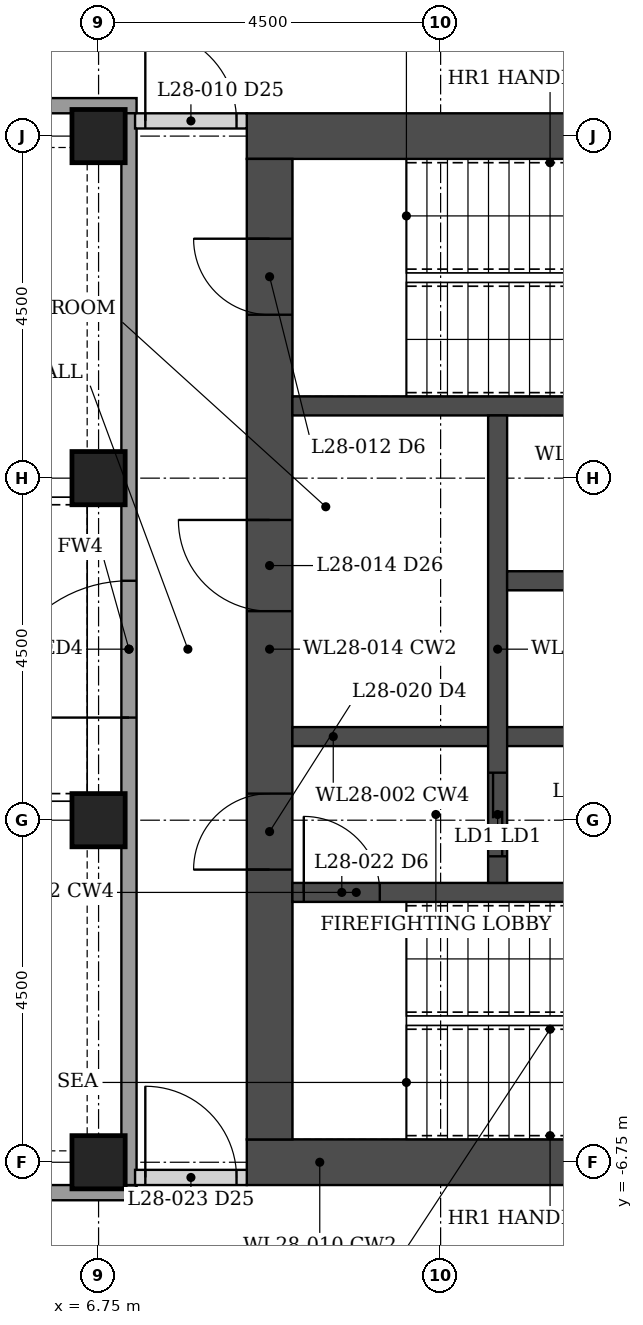
"""IFC4 building model, lengths in metres.
Left out: names, types, materials, properties, quantities, classifications, styles, units other than length and angle.
Written with IfcOpenShell. Run it as: python <this file> out.ifc"""

import sys

from ifc_helpers import new_model, si_unit, direction, frame, frame_2d, origin, origin_2d, place, context, subcontext, project, spatial, rectangle, hollow_rectangle, extrude, element, fill, save


model = new_model("IFC4")
c1 = context("Model", 3, precision=1e-05, world=origin(), true_north=direction((0.0, 1.0)))
c2 = subcontext(c1, "Body", "Model", "MODEL_VIEW")
j1 = project(units=[si_unit("LENGTHUNIT", "METRE"), si_unit("PLANEANGLEUNIT", "RADIAN")], contexts=[c1])
p1 = place(None, origin())
s1 = spatial("IfcSite", under=j1, at=p1, CompositionType="ELEMENT")
p2 = place(p1, origin())
s2 = spatial("IfcBuilding", under=s1, at=p2, CompositionType="ELEMENT")
p3 = place(p2, frame((0.0, 0.0, 107.0)))
s3 = spatial("IfcBuildingStorey", under=s2, at=p3, CompositionType="ELEMENT", Elevation=107.0)
for number, where, z_axis, x_axis in (
    (1, (6.75, -6.75, 0.0), (0.0, 0.0, 1.0), (1.0, 0.0, 0.0)),
    (2, (6.75, -2.25, 0.0), (0.0, 0.0, 1.0), (1.0, 0.0, 0.0)),
    (3, (6.75, 2.25, 0.0), (0.0, 0.0, 1.0), (1.0, 0.0, 0.0)),
    (4, (6.75, 6.75, 0.0), (0.0, 0.0, 1.0), (1.0, 0.0, 0.0)),
):
    element("IfcColumn", number, at=place(p3, frame(where, z_axis=z_axis, x_axis=x_axis)), inside=s3, PredefinedType="COLUMN", context=c2, shape_type="SweptSolid", body=[
        extrude(hollow_rectangle(XDim=0.7, YDim=0.7, WallThickness=0.05, at=origin_2d()), origin(), (0.0, 0.0, 1.0), 5.4),
    ])
for number, where, z_axis, x_axis in (
    (5, (8.7, -6.75, 0.0), (0.0, 0.0, 1.0), (1.0, 0.0, 0.0)),
    (6, (8.7, 6.75, 0.0), (0.0, 0.0, 1.0), (1.0, 0.0, 0.0)),
):
    element("IfcWall", number, at=place(p3, frame(where, z_axis=z_axis, x_axis=x_axis)), inside=s3, PredefinedType="SHEAR", context=c2, shape_type="SweptSolid", body=[
        extrude(rectangle(XDim=9.6, YDim=0.6, at=frame_2d((4.8, 0.0))), origin(), (0.0, 0.0, 1.0), 5.4),
    ])
p4 = place(p3, frame((9.0, -6.45, 0.0), z_axis=(0.0, 0.0, 1.0), x_axis=(0.0, 1.0, 0.0)))
e7 = element("IfcWall", 7, at=p4, inside=s3, PredefinedType="SHEAR", context=c2, shape_type="SweptSolid", body=[
    extrude(rectangle(XDim=12.9, YDim=0.6, at=frame_2d((6.45, 0.0))), origin(), (0.0, 0.0, 1.0), 5.4),
])
p5 = place(p4, frame((3.55, 0.0, 0.0)))
e8 = element("IfcOpeningElement", 8, at=p5, cuts=e7, PredefinedType="OPENING", context=c2, shape_type="SweptSolid", body=[
    extrude(rectangle(XDim=1.0, YDim=2.1, at=frame_2d((0.5, 1.05))), frame((0.0, 0.31, 0.0), z_axis=(0.0, -1.0, 0.0), x_axis=(1.0, 0.0, 0.0)), (0.0, 0.0, 1.0), 0.62),
])
p6 = place(p4, frame((6.95, 0.0, 0.0)))
e9 = element("IfcOpeningElement", 9, at=p6, cuts=e7, PredefinedType="OPENING", context=c2, shape_type="SweptSolid", body=[
    extrude(rectangle(XDim=1.2, YDim=2.1, at=frame_2d((0.6, 1.05))), frame((0.0, 0.31, 0.0), z_axis=(0.0, -1.0, 0.0), x_axis=(1.0, 0.0, 0.0)), (0.0, 0.0, 1.0), 0.62),
])
p7 = place(p4, frame((10.85, 0.0, 0.0)))
e10 = element("IfcOpeningElement", 10, at=p7, cuts=e7, PredefinedType="OPENING", context=c2, shape_type="SweptSolid", body=[
    extrude(rectangle(XDim=1.0, YDim=2.1, at=frame_2d((0.5, 1.05))), frame((0.0, 0.31, 0.0), z_axis=(0.0, -1.0, 0.0), x_axis=(1.0, 0.0, 0.0)), (0.0, 0.0, 1.0), 0.62),
])
p8 = place(p3, frame((9.3, -3.2, 0.0), z_axis=(0.0, 0.0, 1.0), x_axis=(1.0, 0.0, 0.0)))
e11 = element("IfcWall", 11, at=p8, inside=s3, PredefinedType="SHEAR", context=c2, shape_type="SweptSolid", body=[
    extrude(rectangle(XDim=8.4, YDim=0.25, at=frame_2d((4.2, 0.0))), origin(), (0.0, 0.0, 1.0), 5.4),
])
p9 = place(p8, frame((0.15, 0.0, 0.0)))
e12 = element("IfcOpeningElement", 12, at=p9, cuts=e11, PredefinedType="OPENING", context=c2, shape_type="SweptSolid", body=[
    extrude(rectangle(XDim=1.0, YDim=2.1, at=frame_2d((0.5, 1.05))), frame((0.0, 0.135, 0.0), z_axis=(0.0, -1.0, 0.0), x_axis=(1.0, 0.0, 0.0)), (0.0, 0.0, 1.0), 0.27),
])
p10 = place(p3, frame((9.3, 3.2, 0.0), z_axis=(0.0, 0.0, 1.0), x_axis=(1.0, 0.0, 0.0)))
e13 = element("IfcWall", 13, at=p10, inside=s3, PredefinedType="SHEAR", context=c2, shape_type="SweptSolid", body=[
    extrude(rectangle(XDim=8.4, YDim=0.25, at=frame_2d((4.2, 0.0))), origin(), (0.0, 0.0, 1.0), 5.4),
])
p11 = place(p3, frame((9.3, -1.15, 0.0), z_axis=(0.0, 0.0, 1.0), x_axis=(1.0, 0.0, 0.0)))
e14 = element("IfcWall", 14, at=p11, inside=s3, PredefinedType="SHEAR", context=c2, shape_type="SweptSolid", body=[
    extrude(rectangle(XDim=5.375, YDim=0.25, at=frame_2d((2.688, 0.0))), origin(), (0.0, 0.0, 1.0), 5.4),
])
p12 = place(p3, frame((12.0, -3.075, 0.0), z_axis=(0.0, 0.0, 1.0), x_axis=(0.0, 1.0, 0.0)))
e15 = element("IfcWall", 15, at=p12, inside=s3, PredefinedType="SHEAR", context=c2, shape_type="SweptSolid", body=[
    extrude(rectangle(XDim=6.15, YDim=0.25, at=frame_2d((3.075, 0.0))), origin(), (0.0, 0.0, 1.0), 5.4),
])
p13 = place(p12, frame((0.35, 0.0, 0.0)))
e16 = element("IfcOpeningElement", 16, at=p13, cuts=e15, PredefinedType="OPENING", context=c2, shape_type="SweptSolid", body=[
    extrude(rectangle(XDim=1.1, YDim=2.1, at=frame_2d((0.55, 1.05))), frame((0.0, 0.135, 0.0), z_axis=(0.0, -1.0, 0.0), x_axis=(1.0, 0.0, 0.0)), (0.0, 0.0, 1.0), 0.27),
])
p14 = place(p3, frame((12.125, 0.9, 0.0), z_axis=(0.0, 0.0, 1.0), x_axis=(1.0, 0.0, 0.0)))
e17 = element("IfcWall", 17, at=p14, inside=s3, PredefinedType="SHEAR", context=c2, shape_type="SweptSolid", body=[
    extrude(rectangle(XDim=2.55, YDim=0.25, at=frame_2d((1.275, 0.0))), origin(), (0.0, 0.0, 1.0), 5.4),
])
for number, where, z_axis, x_axis in (
    (18, (-7.25, 7.15, 0.0), (0.0, 0.0, 1.0), (1.0, 0.0, 0.0)),
    (19, (-7.25, -7.15, 0.0), (0.0, 0.0, 1.0), (1.0, 0.0, 0.0)),
):
    element("IfcWall", number, at=place(p3, frame(where, z_axis=z_axis, x_axis=x_axis)), inside=s3, PredefinedType="SOLIDWALL", context=c2, shape_type="SweptSolid", body=[
        extrude(rectangle(XDim=14.5, YDim=0.2, at=frame_2d((7.25, 0.0))), origin(), (0.0, 0.0, 1.0), 4.229),
    ])
p15 = place(p3, frame((7.15, -7.05, 0.0), z_axis=(0.0, 0.0, 1.0), x_axis=(0.0, 1.0, 0.0)))
e20 = element("IfcWall", 20, at=p15, inside=s3, PredefinedType="SOLIDWALL", context=c2, shape_type="SweptSolid", body=[
    extrude(rectangle(XDim=14.1, YDim=0.2, at=frame_2d((7.05, 0.0))), origin(), (0.0, 0.0, 1.0), 4.229),
])
p16 = place(p15, frame((6.15, 0.0, 0.0)))
e21 = element("IfcOpeningElement", 21, at=p16, cuts=e20, PredefinedType="OPENING", context=c2, shape_type="SweptSolid", body=[
    extrude(rectangle(XDim=1.8, YDim=2.2, at=frame_2d((0.9, 1.1))), frame((0.0, 0.11, 0.0), z_axis=(0.0, -1.0, 0.0), x_axis=(1.0, 0.0, 0.0)), (0.0, 0.0, 1.0), 0.22),
])
p17 = place(p3, frame((7.23, 6.95, 0.0), z_axis=(0.0, 0.0, 1.0), x_axis=(1.0, 0.0, 0.0)))
e22 = element("IfcWall", 22, at=p17, inside=s3, PredefinedType="PARTITIONING", context=c2, shape_type="SweptSolid", body=[
    extrude(rectangle(XDim=1.47, YDim=0.2, at=frame_2d((0.735, 0.0))), origin(), (0.0, 0.0, 1.0), 4.229),
])
p18 = place(p17, frame((0.135, 0.0, 0.0)))
e23 = element("IfcOpeningElement", 23, at=p18, cuts=e22, PredefinedType="OPENING", context=c2, shape_type="SweptSolid", body=[
    extrude(rectangle(XDim=1.2, YDim=2.1, at=frame_2d((0.6, 1.05))), frame((0.0, 0.11, 0.0), z_axis=(0.0, -1.0, 0.0), x_axis=(1.0, 0.0, 0.0)), (0.0, 0.0, 1.0), 0.22),
])
p19 = place(p3, frame((7.23, -6.95, 0.0), z_axis=(0.0, 0.0, 1.0), x_axis=(1.0, 0.0, 0.0)))
e24 = element("IfcWall", 24, at=p19, inside=s3, PredefinedType="PARTITIONING", context=c2, shape_type="SweptSolid", body=[
    extrude(rectangle(XDim=1.47, YDim=0.2, at=frame_2d((0.735, 0.0))), origin(), (0.0, 0.0, 1.0), 4.229),
])
p20 = place(p19, frame((0.135, 0.0, 0.0)))
e25 = element("IfcOpeningElement", 25, at=p20, cuts=e24, PredefinedType="OPENING", context=c2, shape_type="SweptSolid", body=[
    extrude(rectangle(XDim=1.2, YDim=2.1, at=frame_2d((0.6, 1.05))), frame((0.0, 0.11, 0.0), z_axis=(0.0, -1.0, 0.0), x_axis=(1.0, 0.0, 0.0)), (0.0, 0.0, 1.0), 0.22),
])
p21 = place(p16, origin())
e26 = element("IfcDoor", 26, at=p21, inside=s3, OperationType="DOUBLE_DOOR_SINGLE_SWING", PredefinedType="DOOR", context=c2, shape_type="SweptSolid", body=[
    extrude(rectangle(XDim=1.8, YDim=2.2, at=frame_2d((0.9, 1.1))), frame((0.0, 0.025, 0.0), z_axis=(0.0, -1.0, 0.0), x_axis=(1.0, 0.0, 0.0)), (0.0, 0.0, 1.0), 0.05),
])
fill(e21, e26)
p22 = place(p18, origin())
e27 = element("IfcDoor", 27, at=p22, inside=s3, OperationType="DOUBLE_DOOR_DOUBLE_SWING", PredefinedType="DOOR", context=c2, shape_type="SweptSolid", body=[
    extrude(rectangle(XDim=1.2, YDim=2.1, at=frame_2d((0.6, 1.05))), frame((0.0, 0.025, 0.0), z_axis=(0.0, -1.0, 0.0), x_axis=(1.0, 0.0, 0.0)), (0.0, 0.0, 1.0), 0.05),
])
fill(e23, e27)
p23 = place(p20, origin())
e28 = element("IfcDoor", 28, at=p23, inside=s3, OperationType="DOUBLE_DOOR_DOUBLE_SWING", PredefinedType="DOOR", context=c2, shape_type="SweptSolid", body=[
    extrude(rectangle(XDim=1.2, YDim=2.1, at=frame_2d((0.6, 1.05))), frame((0.0, 0.025, 0.0), z_axis=(0.0, -1.0, 0.0), x_axis=(1.0, 0.0, 0.0)), (0.0, 0.0, 1.0), 0.05),
])
fill(e25, e28)
p24 = place(p5, origin())
e29 = element("IfcDoor", 29, at=p24, inside=s3, OperationType="SINGLE_SWING_LEFT", PredefinedType="DOOR", context=c2, shape_type="SweptSolid", body=[
    extrude(rectangle(XDim=1.0, YDim=2.1, at=frame_2d((0.5, 1.05))), frame((0.0, 0.025, 0.0), z_axis=(0.0, -1.0, 0.0), x_axis=(1.0, 0.0, 0.0)), (0.0, 0.0, 1.0), 0.05),
])
fill(e8, e29)
p25 = place(p9, origin())
e30 = element("IfcDoor", 30, at=p25, inside=s3, OperationType="SINGLE_SWING_LEFT", PredefinedType="DOOR", context=c2, shape_type="SweptSolid", body=[
    extrude(rectangle(XDim=1.0, YDim=2.1, at=frame_2d((0.5, 1.05))), frame((0.0, 0.025, 0.0), z_axis=(0.0, -1.0, 0.0), x_axis=(1.0, 0.0, 0.0)), (0.0, 0.0, 1.0), 0.05),
])
fill(e12, e30)
p26 = place(p6, origin())
e31 = element("IfcDoor", 31, at=p26, inside=s3, OperationType="SINGLE_SWING_RIGHT", PredefinedType="DOOR", context=c2, shape_type="SweptSolid", body=[
    extrude(rectangle(XDim=1.2, YDim=2.1, at=frame_2d((0.6, 1.05))), frame((0.0, 0.025, 0.0), z_axis=(0.0, -1.0, 0.0), x_axis=(1.0, 0.0, 0.0)), (0.0, 0.0, 1.0), 0.05),
])
fill(e9, e31)
p27 = place(p7, origin())
e32 = element("IfcDoor", 32, at=p27, inside=s3, OperationType="SINGLE_SWING_RIGHT", PredefinedType="DOOR", context=c2, shape_type="SweptSolid", body=[
    extrude(rectangle(XDim=1.0, YDim=2.1, at=frame_2d((0.5, 1.05))), frame((0.0, 0.025, 0.0), z_axis=(0.0, -1.0, 0.0), x_axis=(1.0, 0.0, 0.0)), (0.0, 0.0, 1.0), 0.05),
])
fill(e10, e32)
p28 = place(p13, origin())
e33 = element("IfcDoor", 33, at=p28, inside=s3, OperationType="DOUBLE_DOOR_SLIDING", PredefinedType="DOOR", context=c2, shape_type="SweptSolid", body=[
    extrude(rectangle(XDim=1.1, YDim=2.1, at=frame_2d((0.55, 1.05))), frame((0.0, 0.025, 0.0), z_axis=(0.0, -1.0, 0.0), x_axis=(1.0, 0.0, 0.0)), (0.0, 0.0, 1.0), 0.05),
])
fill(e16, e33)
save(model, sys.argv[1])
